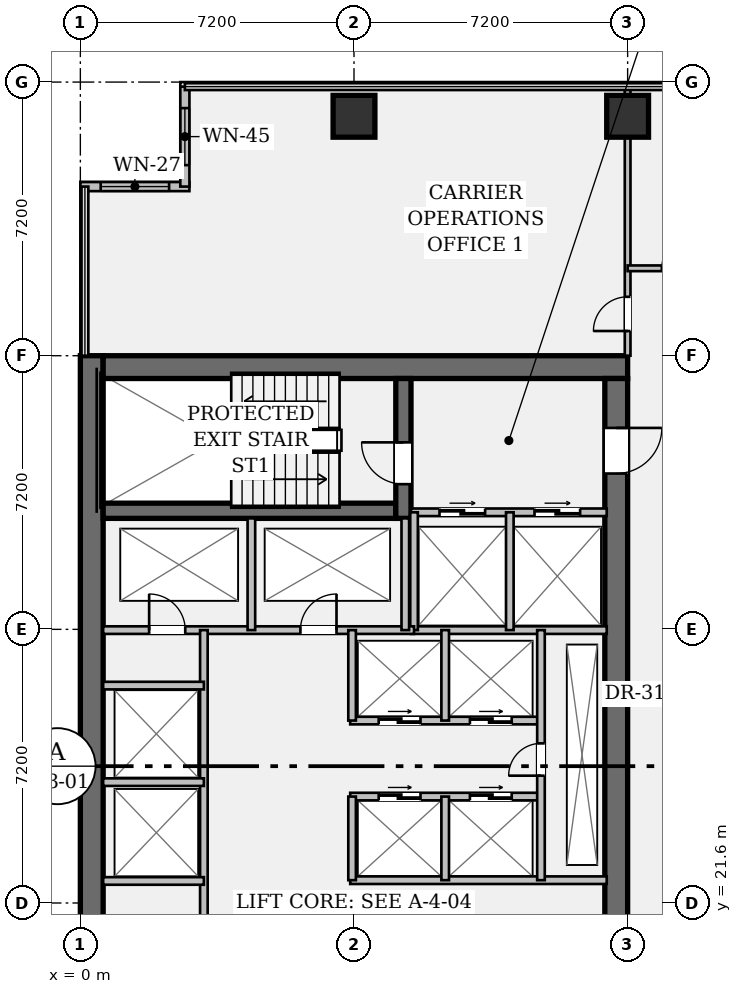
"""IFC4 building model, lengths in metres.
Left out: names, types, materials, properties, quantities, classifications, styles, units other than length and angle.
Written with IfcOpenShell. Run it as: python <this file> out.ifc"""

import sys

from ifc_helpers import new_model, si_unit, direction, frame, frame_2d, origin, origin_2d, place, context, subcontext, project, spatial, rectangle, hollow_rectangle, extrude, element, fill, save


model = new_model("IFC4")
c1 = context("Model", 3, precision=1e-05, world=origin(), true_north=direction((0.0, 1.0)))
c2 = subcontext(c1, "Body", "Model", "MODEL_VIEW")
j1 = project(units=[si_unit("LENGTHUNIT", "METRE"), si_unit("PLANEANGLEUNIT", "RADIAN")], contexts=[c1])
p1 = place(None, origin())
s1 = spatial("IfcSite", under=j1, at=p1, CompositionType="ELEMENT")
p2 = place(p1, origin())
s2 = spatial("IfcBuilding", under=s1, at=p2, CompositionType="ELEMENT")
p3 = place(p2, frame((0.0, 0.0, 42.7)))
s3 = spatial("IfcBuildingStorey", under=s2, at=p3, CompositionType="ELEMENT", Elevation=42.7)
p4 = place(p3, frame((0.3, 7.2, 0.0), z_axis=(0.0, 0.0, 1.0), x_axis=(0.0, 1.0, 0.0)))
e1 = element("IfcWall", 1, at=p4, inside=s3, PredefinedType="SHEAR", context=c2, shape_type="SweptSolid", body=[
    extrude(rectangle(XDim=28.8, YDim=0.6, at=frame_2d((14.4, 0.0))), origin(), (0.0, 0.0, 1.0), 3.57),
])
p5 = place(p3, frame((0.6, 35.7, 0.0), z_axis=(0.0, 0.0, 1.0), x_axis=(1.0, 0.0, 0.0)))
e2 = element("IfcWall", 2, at=p5, inside=s3, PredefinedType="SHEAR", context=c2, shape_type="SweptSolid", body=[
    extrude(rectangle(XDim=13.8, YDim=0.6, at=frame_2d((6.9, 0.0))), origin(), (0.0, 0.0, 1.0), 3.57),
])
p6 = place(p3, frame((14.1, 35.4, 0.0), z_axis=(0.0, 0.0, 1.0), x_axis=(0.0, -1.0, 0.0)))
e3 = element("IfcWall", 3, at=p6, inside=s3, PredefinedType="SHEAR", context=c2, shape_type="SweptSolid", body=[
    extrude(rectangle(XDim=27.6, YDim=0.6, at=frame_2d((13.8, 0.0))), origin(), (0.0, 0.0, 1.0), 3.57),
])
p7 = place(p6, frame((1.3, 0.0, 0.0)))
e4 = element("IfcOpeningElement", 4, at=p7, cuts=e3, PredefinedType="OPENING", context=c2, shape_type="SweptSolid", body=[
    extrude(rectangle(XDim=1.2, YDim=2.15, at=frame_2d((0.6, 1.075))), frame((0.0, 0.312, 0.0), z_axis=(0.0, -1.0, 0.0), x_axis=(1.0, 0.0, 0.0)), (0.0, 0.0, 1.0), 0.624),
])
p8 = place(p6, frame((25.25, 0.0, 0.0)))
e5 = element("IfcOpeningElement", 5, at=p8, cuts=e3, PredefinedType="OPENING", context=c2, shape_type="SweptSolid", body=[
    extrude(rectangle(XDim=1.2, YDim=2.15, at=frame_2d((0.6, 1.075))), frame((0.0, 0.312, 0.0), z_axis=(0.0, -1.0, 0.0), x_axis=(1.0, 0.0, 0.0)), (0.0, 0.0, 1.0), 0.624),
])
p9 = place(p6, frame((14.6, 0.0, 0.0)))
e6 = element("IfcOpeningElement", 6, at=p9, cuts=e3, PredefinedType="OPENING", context=c2, shape_type="SweptSolid", body=[
    extrude(rectangle(XDim=1.6, YDim=2.2, at=frame_2d((0.8, 1.1))), frame((0.0, 0.312, 0.0), z_axis=(0.0, -1.0, 0.0), x_axis=(1.0, 0.0, 0.0)), (0.0, 0.0, 1.0), 0.624),
])
p10 = place(p3, frame((0.6, 31.92, 0.0), z_axis=(0.0, 0.0, 1.0), x_axis=(1.0, 0.0, 0.0)))
e7 = element("IfcWall", 7, at=p10, inside=s3, PredefinedType="SHEAR", context=c2, shape_type="SweptSolid", body=[
    extrude(rectangle(XDim=7.7, YDim=0.4, at=frame_2d((3.85, 0.0))), origin(), (0.0, 0.0, 1.0), 3.57),
])
p11 = place(p3, frame((8.5, 31.72, 0.0), z_axis=(0.0, 0.0, 1.0), x_axis=(0.0, 1.0, 0.0)))
e8 = element("IfcWall", 8, at=p11, inside=s3, PredefinedType="SHEAR", context=c2, shape_type="SweptSolid", body=[
    extrude(rectangle(XDim=3.68, YDim=0.4, at=frame_2d((1.84, 0.0))), origin(), (0.0, 0.0, 1.0), 3.57),
])
p12 = place(p11, frame((0.9, 0.0, 0.0)))
e9 = element("IfcOpeningElement", 9, at=p12, cuts=e8, PredefinedType="OPENING", context=c2, shape_type="SweptSolid", body=[
    extrude(rectangle(XDim=1.1, YDim=2.15, at=frame_2d((0.55, 1.075))), frame((0.0, 0.212, 0.0), z_axis=(0.0, -1.0, 0.0), x_axis=(1.0, 0.0, 0.0)), (0.0, 0.0, 1.0), 0.424),
])
for number, where, z_axis, x_axis in (
    (10, (7.2, 42.3, 0.0), (0.0, 0.0, 1.0), (1.0, 0.0, 0.0)),
    (11, (14.4, 42.3, 0.0), (0.0, 0.0, 1.0), (1.0, 0.0, 0.0)),
):
    element("IfcColumn", number, at=place(p3, frame(where, z_axis=z_axis, x_axis=x_axis)), inside=s3, PredefinedType="COLUMN", context=c2, shape_type="SweptSolid", body=[
        extrude(hollow_rectangle(XDim=1.1, YDim=1.1, WallThickness=0.07, at=origin_2d()), origin(), (0.0, 0.0, 1.0), 3.57),
    ])
p13 = place(p3, frame((0.0, 40.45, 0.0), z_axis=(0.0, 0.0, 1.0), x_axis=(1.0, 0.0, 0.0)))
e12 = element("IfcWall", 12, at=p13, inside=s3, PredefinedType="STANDARD", context=c2, shape_type="SweptSolid", body=[
    extrude(rectangle(XDim=2.87, YDim=0.24, at=frame_2d((1.435, 0.0))), origin(), (0.0, 0.0, 1.0), 3.57),
])
p14 = place(p13, frame((0.535, 0.0, 0.95)))
e13 = element("IfcOpeningElement", 13, at=p14, cuts=e12, PredefinedType="OPENING", context=c2, shape_type="SweptSolid", body=[
    extrude(rectangle(XDim=1.8, YDim=1.35, at=frame_2d((0.9, 0.675))), frame((0.0, 0.132, 0.0), z_axis=(0.0, -1.0, 0.0), x_axis=(1.0, 0.0, 0.0)), (0.0, 0.0, 1.0), 0.264),
])
p15 = place(p3, frame((2.75, 40.45, 0.0), z_axis=(0.0, 0.0, 1.0), x_axis=(0.0, 1.0, 0.0)))
e14 = element("IfcWall", 14, at=p15, inside=s3, PredefinedType="STANDARD", context=c2, shape_type="SweptSolid", body=[
    extrude(rectangle(XDim=2.63, YDim=0.24, at=frame_2d((1.315, 0.0))), origin(), (0.0, 0.0, 1.0), 3.57),
])
p16 = place(p15, frame((0.565, 0.0, 0.95)))
e15 = element("IfcOpeningElement", 15, at=p16, cuts=e14, PredefinedType="OPENING", context=c2, shape_type="SweptSolid", body=[
    extrude(rectangle(XDim=1.5, YDim=1.8, at=frame_2d((0.75, 0.9))), frame((0.0, 0.132, 0.0), z_axis=(0.0, -1.0, 0.0), x_axis=(1.0, 0.0, 0.0)), (0.0, 0.0, 1.0), 0.264),
])
p17 = place(p3, frame((8.7, 31.88, 0.0), z_axis=(0.0, 0.0, 1.0), x_axis=(1.0, 0.0, 0.0)))
e16 = element("IfcWall", 16, at=p17, inside=s3, PredefinedType="PARTITIONING", context=c2, shape_type="SweptSolid", body=[
    extrude(rectangle(XDim=5.15, YDim=0.2, at=frame_2d((2.575, 0.0))), origin(), (0.0, 0.0, 1.0), 3.57),
])
p18 = place(p17, frame((0.75, 0.0, 0.0)))
e17 = element("IfcOpeningElement", 17, at=p18, cuts=e16, PredefinedType="OPENING", context=c2, shape_type="SweptSolid", body=[
    extrude(rectangle(XDim=1.2, YDim=2.2, at=frame_2d((0.6, 1.1))), frame((0.0, 0.112, 0.0), z_axis=(0.0, -1.0, 0.0), x_axis=(1.0, 0.0, 0.0)), (0.0, 0.0, 1.0), 0.224),
])
p19 = place(p17, frame((3.25, 0.0, 0.0)))
e18 = element("IfcOpeningElement", 18, at=p19, cuts=e16, PredefinedType="OPENING", context=c2, shape_type="SweptSolid", body=[
    extrude(rectangle(XDim=1.2, YDim=2.2, at=frame_2d((0.6, 1.1))), frame((0.0, 0.112, 0.0), z_axis=(0.0, -1.0, 0.0), x_axis=(1.0, 0.0, 0.0)), (0.0, 0.0, 1.0), 0.224),
])
p20 = place(p3, frame((8.7, 28.78, 0.0), z_axis=(0.0, 0.0, 1.0), x_axis=(1.0, 0.0, 0.0)))
e19 = element("IfcWall", 19, at=p20, inside=s3, PredefinedType="PARTITIONING", context=c2, shape_type="SweptSolid", body=[
    extrude(rectangle(XDim=5.15, YDim=0.2, at=frame_2d((2.575, 0.0))), origin(), (0.0, 0.0, 1.0), 3.57),
])
for number, where, z_axis, x_axis in (
    (20, (8.78, 28.78, 0.0), (0.0, 0.0, 1.0), (0.0, 1.0, 0.0)),
    (21, (11.3, 28.78, 0.0), (0.0, 0.0, 1.0), (0.0, 1.0, 0.0)),
):
    element("IfcWall", number, at=place(p3, frame(where, z_axis=z_axis, x_axis=x_axis)), inside=s3, PredefinedType="PARTITIONING", context=c2, shape_type="SweptSolid", body=[
        extrude(rectangle(XDim=3.1, YDim=0.2, at=frame_2d((1.55, 0.0))), origin(), (0.0, 0.0, 1.0), 3.57),
    ])
p21 = place(p3, frame((0.6, 28.78, 0.0), z_axis=(0.0, 0.0, 1.0), x_axis=(1.0, 0.0, 0.0)))
e22 = element("IfcWall", 22, at=p21, inside=s3, PredefinedType="PARTITIONING", context=c2, shape_type="SweptSolid", body=[
    extrude(rectangle(XDim=8.18, YDim=0.2, at=frame_2d((4.09, 0.0))), origin(), (0.0, 0.0, 1.0), 3.57),
])
p22 = place(p21, frame((1.21, 0.0, 0.0)))
e23 = element("IfcOpeningElement", 23, at=p22, cuts=e22, PredefinedType="OPENING", context=c2, shape_type="SweptSolid", body=[
    extrude(rectangle(XDim=0.95, YDim=2.15, at=frame_2d((0.475, 1.075))), frame((0.0, 0.112, 0.0), z_axis=(0.0, -1.0, 0.0), x_axis=(1.0, 0.0, 0.0)), (0.0, 0.0, 1.0), 0.224),
])
p23 = place(p21, frame((5.19, 0.0, 0.0)))
e24 = element("IfcOpeningElement", 24, at=p23, cuts=e22, PredefinedType="OPENING", context=c2, shape_type="SweptSolid", body=[
    extrude(rectangle(XDim=0.95, YDim=2.15, at=frame_2d((0.475, 1.075))), frame((0.0, 0.112, 0.0), z_axis=(0.0, -1.0, 0.0), x_axis=(1.0, 0.0, 0.0)), (0.0, 0.0, 1.0), 0.224),
])
for number, where, z_axis, x_axis in (
    (25, (4.5, 28.78, 0.0), (0.0, 0.0, 1.0), (0.0, 1.0, 0.0)),
    (26, (8.55, 28.78, 0.0), (0.0, 0.0, 1.0), (0.0, 1.0, 0.0)),
):
    element("IfcWall", number, at=place(p3, frame(where, z_axis=z_axis, x_axis=x_axis)), inside=s3, PredefinedType="PARTITIONING", context=c2, shape_type="SweptSolid", body=[
        extrude(rectangle(XDim=2.94, YDim=0.2, at=frame_2d((1.47, 0.0))), origin(), (0.0, 0.0, 1.0), 3.57),
    ])
p24 = place(p3, frame((3.25, 15.7, 0.0), z_axis=(0.0, 0.0, 1.0), x_axis=(0.0, 1.0, 0.0)))
e27 = element("IfcWall", 27, at=p24, inside=s3, PredefinedType="PARTITIONING", context=c2, shape_type="SweptSolid", body=[
    extrude(rectangle(XDim=13.08, YDim=0.2, at=frame_2d((6.54, 0.0))), origin(), (0.0, 0.0, 1.0), 3.57),
])
for number, where, z_axis, x_axis in (
    (28, (0.6, 22.18, 0.0), (0.0, 0.0, 1.0), (1.0, 0.0, 0.0)),
    (29, (0.6, 24.78, 0.0), (0.0, 0.0, 1.0), (1.0, 0.0, 0.0)),
    (30, (0.6, 27.32, 0.0), (0.0, 0.0, 1.0), (1.0, 0.0, 0.0)),
):
    element("IfcWall", number, at=place(p3, frame(where, z_axis=z_axis, x_axis=x_axis)), inside=s3, PredefinedType="PARTITIONING", context=c2, shape_type="SweptSolid", body=[
        extrude(rectangle(XDim=2.65, YDim=0.2, at=frame_2d((1.325, 0.0))), origin(), (0.0, 0.0, 1.0), 3.57),
    ])
p25 = place(p3, frame((7.1, 22.2, 0.0), z_axis=(0.0, 0.0, 1.0), x_axis=(1.0, 0.0, 0.0)))
e31 = element("IfcWall", 31, at=p25, inside=s3, PredefinedType="PARTITIONING", context=c2, shape_type="SweptSolid", body=[
    extrude(rectangle(XDim=6.75, YDim=0.2, at=frame_2d((3.375, 0.0))), origin(), (0.0, 0.0, 1.0), 3.57),
])
p26 = place(p3, frame((7.1, 24.4, 0.0), z_axis=(0.0, 0.0, 1.0), x_axis=(1.0, 0.0, 0.0)))
e32 = element("IfcWall", 32, at=p26, inside=s3, PredefinedType="PARTITIONING", context=c2, shape_type="SweptSolid", body=[
    extrude(rectangle(XDim=5.02, YDim=0.2, at=frame_2d((2.51, 0.0))), origin(), (0.0, 0.0, 1.0), 3.57),
])
p27 = place(p26, frame((0.75, 0.0, 0.0)))
e33 = element("IfcOpeningElement", 33, at=p27, cuts=e32, PredefinedType="OPENING", context=c2, shape_type="SweptSolid", body=[
    extrude(rectangle(XDim=1.1, YDim=2.2, at=frame_2d((0.55, 1.1))), frame((0.0, 0.112, 0.0), z_axis=(0.0, -1.0, 0.0), x_axis=(1.0, 0.0, 0.0)), (0.0, 0.0, 1.0), 0.224),
])
p28 = place(p26, frame((3.15, 0.0, 0.0)))
e34 = element("IfcOpeningElement", 34, at=p28, cuts=e32, PredefinedType="OPENING", context=c2, shape_type="SweptSolid", body=[
    extrude(rectangle(XDim=1.1, YDim=2.2, at=frame_2d((0.55, 1.1))), frame((0.0, 0.112, 0.0), z_axis=(0.0, -1.0, 0.0), x_axis=(1.0, 0.0, 0.0)), (0.0, 0.0, 1.0), 0.224),
])
p29 = place(p3, frame((7.1, 26.4, 0.0), z_axis=(0.0, 0.0, 1.0), x_axis=(1.0, 0.0, 0.0)))
e35 = element("IfcWall", 35, at=p29, inside=s3, PredefinedType="PARTITIONING", context=c2, shape_type="SweptSolid", body=[
    extrude(rectangle(XDim=5.02, YDim=0.2, at=frame_2d((2.51, 0.0))), origin(), (0.0, 0.0, 1.0), 3.57),
])
p30 = place(p29, frame((0.75, 0.0, 0.0)))
e36 = element("IfcOpeningElement", 36, at=p30, cuts=e35, PredefinedType="OPENING", context=c2, shape_type="SweptSolid", body=[
    extrude(rectangle(XDim=1.1, YDim=2.2, at=frame_2d((0.55, 1.1))), frame((0.0, 0.112, 0.0), z_axis=(0.0, -1.0, 0.0), x_axis=(1.0, 0.0, 0.0)), (0.0, 0.0, 1.0), 0.224),
])
p31 = place(p29, frame((3.15, 0.0, 0.0)))
e37 = element("IfcOpeningElement", 37, at=p31, cuts=e35, PredefinedType="OPENING", context=c2, shape_type="SweptSolid", body=[
    extrude(rectangle(XDim=1.1, YDim=2.2, at=frame_2d((0.55, 1.1))), frame((0.0, 0.112, 0.0), z_axis=(0.0, -1.0, 0.0), x_axis=(1.0, 0.0, 0.0)), (0.0, 0.0, 1.0), 0.224),
])
p32 = place(p3, frame((7.15, 22.2, 0.0), z_axis=(0.0, 0.0, 1.0), x_axis=(0.0, 1.0, 0.0)))
e38 = element("IfcWall", 38, at=p32, inside=s3, PredefinedType="PARTITIONING", context=c2, shape_type="SweptSolid", body=[
    extrude(rectangle(XDim=2.2, YDim=0.2, at=frame_2d((1.1, 0.0))), origin(), (0.0, 0.0, 1.0), 3.57),
])
p33 = place(p3, frame((7.15, 26.4, 0.0), z_axis=(0.0, 0.0, 1.0), x_axis=(0.0, 1.0, 0.0)))
e39 = element("IfcWall", 39, at=p33, inside=s3, PredefinedType="PARTITIONING", context=c2, shape_type="SweptSolid", body=[
    extrude(rectangle(XDim=2.38, YDim=0.2, at=frame_2d((1.19, 0.0))), origin(), (0.0, 0.0, 1.0), 3.57),
])
p34 = place(p3, frame((9.6, 22.2, 0.0), z_axis=(0.0, 0.0, 1.0), x_axis=(0.0, 1.0, 0.0)))
e40 = element("IfcWall", 40, at=p34, inside=s3, PredefinedType="PARTITIONING", context=c2, shape_type="SweptSolid", body=[
    extrude(rectangle(XDim=2.2, YDim=0.2, at=frame_2d((1.1, 0.0))), origin(), (0.0, 0.0, 1.0), 3.57),
])
p35 = place(p3, frame((9.6, 26.4, 0.0), z_axis=(0.0, 0.0, 1.0), x_axis=(0.0, 1.0, 0.0)))
e41 = element("IfcWall", 41, at=p35, inside=s3, PredefinedType="PARTITIONING", context=c2, shape_type="SweptSolid", body=[
    extrude(rectangle(XDim=2.38, YDim=0.2, at=frame_2d((1.19, 0.0))), origin(), (0.0, 0.0, 1.0), 3.57),
])
p36 = place(p3, frame((12.12, 22.2, 0.0), z_axis=(0.0, 0.0, 1.0), x_axis=(0.0, 1.0, 0.0)))
e42 = element("IfcWall", 42, at=p36, inside=s3, PredefinedType="PARTITIONING", context=c2, shape_type="SweptSolid", body=[
    extrude(rectangle(XDim=6.58, YDim=0.2, at=frame_2d((3.29, 0.0))), origin(), (0.0, 0.0, 1.0), 3.57),
])
p37 = place(p36, frame((2.75, 0.0, 0.0)))
e43 = element("IfcOpeningElement", 43, at=p37, cuts=e42, PredefinedType="OPENING", context=c2, shape_type="SweptSolid", body=[
    extrude(rectangle(XDim=0.85, YDim=2.15, at=frame_2d((0.425, 1.075))), frame((0.0, 0.112, 0.0), z_axis=(0.0, -1.0, 0.0), x_axis=(1.0, 0.0, 0.0)), (0.0, 0.0, 1.0), 0.224),
])
p38 = place(p3, frame((14.4, 36.0, 0.0), z_axis=(0.0, 0.0, 1.0), x_axis=(0.0, 1.0, 0.0)))
e44 = element("IfcWall", 44, at=p38, inside=s3, PredefinedType="PARTITIONING", context=c2, shape_type="SweptSolid", body=[
    extrude(rectangle(XDim=7.08, YDim=0.15, at=frame_2d((3.54, 0.0))), origin(), (0.0, 0.0, 1.0), 2.699),
])
p39 = place(p38, frame((0.65, 0.0, 0.0)))
e45 = element("IfcOpeningElement", 45, at=p39, cuts=e44, PredefinedType="OPENING", context=c2, shape_type="SweptSolid", body=[
    extrude(rectangle(XDim=0.9, YDim=2.15, at=frame_2d((0.45, 1.075))), frame((0.0, 0.087, 0.0), z_axis=(0.0, -1.0, 0.0), x_axis=(1.0, 0.0, 0.0)), (0.0, 0.0, 1.0), 0.174),
])
p40 = place(p3, frame((14.4, 38.3, 0.0), z_axis=(0.0, 0.0, 1.0), x_axis=(1.0, 0.0, 0.0)))
e46 = element("IfcWall", 46, at=p40, inside=s3, PredefinedType="PARTITIONING", context=c2, shape_type="SweptSolid", body=[
    extrude(rectangle(XDim=2.95, YDim=0.15, at=frame_2d((1.475, 0.0))), origin(), (0.0, 0.0, 1.0), 2.699),
])
p41 = place(p40, frame((0.9, 0.0, 0.0)))
e47 = element("IfcOpeningElement", 47, at=p41, cuts=e46, PredefinedType="OPENING", context=c2, shape_type="SweptSolid", body=[
    extrude(rectangle(XDim=0.95, YDim=2.15, at=frame_2d((0.475, 1.075))), frame((0.0, 0.087, 0.0), z_axis=(0.0, -1.0, 0.0), x_axis=(1.0, 0.0, 0.0)), (0.0, 0.0, 1.0), 0.174),
])
p42 = place(p14, origin())
e48 = element("IfcWindow", 48, at=p42, inside=s3, PartitioningType="SINGLE_PANEL", PredefinedType="WINDOW", context=c2, shape_type="SweptSolid", body=[
    extrude(rectangle(XDim=1.8, YDim=1.35, at=frame_2d((0.9, 0.675))), frame((0.0, 0.03, 0.0), z_axis=(0.0, -1.0, 0.0), x_axis=(1.0, 0.0, 0.0)), (0.0, 0.0, 1.0), 0.06),
])
fill(e13, e48)
p43 = place(p16, origin())
e49 = element("IfcWindow", 49, at=p43, inside=s3, PartitioningType="SINGLE_PANEL", PredefinedType="WINDOW", context=c2, shape_type="SweptSolid", body=[
    extrude(rectangle(XDim=1.5, YDim=1.8, at=frame_2d((0.75, 0.9))), frame((0.0, 0.03, 0.0), z_axis=(0.0, -1.0, 0.0), x_axis=(1.0, 0.0, 0.0)), (0.0, 0.0, 1.0), 0.06),
])
fill(e15, e49)
p44 = place(p12, origin())
e50 = element("IfcDoor", 50, at=p44, inside=s3, OperationType="SINGLE_SWING_RIGHT", PredefinedType="DOOR", context=c2, shape_type="SweptSolid", body=[
    extrude(rectangle(XDim=1.1, YDim=2.15, at=frame_2d((0.55, 1.075))), frame((0.0, 0.025, 0.0), z_axis=(0.0, -1.0, 0.0), x_axis=(1.0, 0.0, 0.0)), (0.0, 0.0, 1.0), 0.05),
])
fill(e9, e50)
p45 = place(p7, origin())
e51 = element("IfcDoor", 51, at=p45, inside=s3, OperationType="SINGLE_SWING_LEFT", PredefinedType="DOOR", context=c2, shape_type="SweptSolid", body=[
    extrude(rectangle(XDim=1.2, YDim=2.15, at=frame_2d((0.6, 1.075))), frame((0.0, 0.025, 0.0), z_axis=(0.0, -1.0, 0.0), x_axis=(1.0, 0.0, 0.0)), (0.0, 0.0, 1.0), 0.05),
])
fill(e4, e51)
p46 = place(p18, origin())
e52 = element("IfcDoor", 52, at=p46, inside=s3, OperationType="DOUBLE_DOOR_SLIDING", PredefinedType="DOOR", context=c2, shape_type="SweptSolid", body=[
    extrude(rectangle(XDim=1.2, YDim=2.2, at=frame_2d((0.6, 1.1))), frame((0.0, 0.025, 0.0), z_axis=(0.0, -1.0, 0.0), x_axis=(1.0, 0.0, 0.0)), (0.0, 0.0, 1.0), 0.05),
])
fill(e17, e52)
p47 = place(p19, origin())
e53 = element("IfcDoor", 53, at=p47, inside=s3, OperationType="DOUBLE_DOOR_SLIDING", PredefinedType="DOOR", context=c2, shape_type="SweptSolid", body=[
    extrude(rectangle(XDim=1.2, YDim=2.2, at=frame_2d((0.6, 1.1))), frame((0.0, 0.025, 0.0), z_axis=(0.0, -1.0, 0.0), x_axis=(1.0, 0.0, 0.0)), (0.0, 0.0, 1.0), 0.05),
])
fill(e18, e53)
p48 = place(p22, origin())
e54 = element("IfcDoor", 54, at=p48, inside=s3, OperationType="SINGLE_SWING_LEFT", PredefinedType="DOOR", context=c2, shape_type="SweptSolid", body=[
    extrude(rectangle(XDim=0.95, YDim=2.15, at=frame_2d((0.475, 1.075))), frame((0.0, 0.025, 0.0), z_axis=(0.0, -1.0, 0.0), x_axis=(1.0, 0.0, 0.0)), (0.0, 0.0, 1.0), 0.05),
])
fill(e23, e54)
p49 = place(p23, origin())
e55 = element("IfcDoor", 55, at=p49, inside=s3, OperationType="SINGLE_SWING_RIGHT", PredefinedType="DOOR", context=c2, shape_type="SweptSolid", body=[
    extrude(rectangle(XDim=0.95, YDim=2.15, at=frame_2d((0.475, 1.075))), frame((0.0, 0.025, 0.0), z_axis=(0.0, -1.0, 0.0), x_axis=(1.0, 0.0, 0.0)), (0.0, 0.0, 1.0), 0.05),
])
fill(e24, e55)
p50 = place(p37, origin())
e56 = element("IfcDoor", 56, at=p50, inside=s3, OperationType="SINGLE_SWING_LEFT", PredefinedType="DOOR", context=c2, shape_type="SweptSolid", body=[
    extrude(rectangle(XDim=0.85, YDim=2.15, at=frame_2d((0.425, 1.075))), frame((0.0, 0.025, 0.0), z_axis=(0.0, -1.0, 0.0), x_axis=(1.0, 0.0, 0.0)), (0.0, 0.0, 1.0), 0.05),
])
fill(e43, e56)
p51 = place(p27, origin())
e57 = element("IfcDoor", 57, at=p51, inside=s3, OperationType="DOUBLE_DOOR_SLIDING", PredefinedType="DOOR", context=c2, shape_type="SweptSolid", body=[
    extrude(rectangle(XDim=1.1, YDim=2.2, at=frame_2d((0.55, 1.1))), frame((0.0, 0.025, 0.0), z_axis=(0.0, -1.0, 0.0), x_axis=(1.0, 0.0, 0.0)), (0.0, 0.0, 1.0), 0.05),
])
fill(e33, e57)
p52 = place(p28, origin())
e58 = element("IfcDoor", 58, at=p52, inside=s3, OperationType="DOUBLE_DOOR_SLIDING", PredefinedType="DOOR", context=c2, shape_type="SweptSolid", body=[
    extrude(rectangle(XDim=1.1, YDim=2.2, at=frame_2d((0.55, 1.1))), frame((0.0, 0.025, 0.0), z_axis=(0.0, -1.0, 0.0), x_axis=(1.0, 0.0, 0.0)), (0.0, 0.0, 1.0), 0.05),
])
fill(e34, e58)
p53 = place(p30, origin())
e59 = element("IfcDoor", 59, at=p53, inside=s3, OperationType="DOUBLE_DOOR_SLIDING", PredefinedType="DOOR", context=c2, shape_type="SweptSolid", body=[
    extrude(rectangle(XDim=1.1, YDim=2.2, at=frame_2d((0.55, 1.1))), frame((0.0, 0.025, 0.0), z_axis=(0.0, -1.0, 0.0), x_axis=(1.0, 0.0, 0.0)), (0.0, 0.0, 1.0), 0.05),
])
fill(e36, e59)
p54 = place(p31, origin())
e60 = element("IfcDoor", 60, at=p54, inside=s3, OperationType="DOUBLE_DOOR_SLIDING", PredefinedType="DOOR", context=c2, shape_type="SweptSolid", body=[
    extrude(rectangle(XDim=1.1, YDim=2.2, at=frame_2d((0.55, 1.1))), frame((0.0, 0.025, 0.0), z_axis=(0.0, -1.0, 0.0), x_axis=(1.0, 0.0, 0.0)), (0.0, 0.0, 1.0), 0.05),
])
fill(e37, e60)
p55 = place(p39, origin())
e61 = element("IfcDoor", 61, at=p55, inside=s3, OperationType="SINGLE_SWING_LEFT", PredefinedType="DOOR", context=c2, shape_type="SweptSolid", body=[
    extrude(rectangle(XDim=0.9, YDim=2.15, at=frame_2d((0.45, 1.075))), frame((0.0, 0.025, 0.0), z_axis=(0.0, -1.0, 0.0), x_axis=(1.0, 0.0, 0.0)), (0.0, 0.0, 1.0), 0.05),
])
fill(e45, e61)
p56 = place(p41, origin())
e62 = element("IfcDoor", 62, at=p56, inside=s3, OperationType="SINGLE_SWING_RIGHT", PredefinedType="DOOR", context=c2, shape_type="SweptSolid", body=[
    extrude(rectangle(XDim=0.95, YDim=2.15, at=frame_2d((0.475, 1.075))), frame((0.0, 0.025, 0.0), z_axis=(0.0, -1.0, 0.0), x_axis=(1.0, 0.0, 0.0)), (0.0, 0.0, 1.0), 0.05),
])
fill(e47, e62)
save(model, sys.argv[1])
